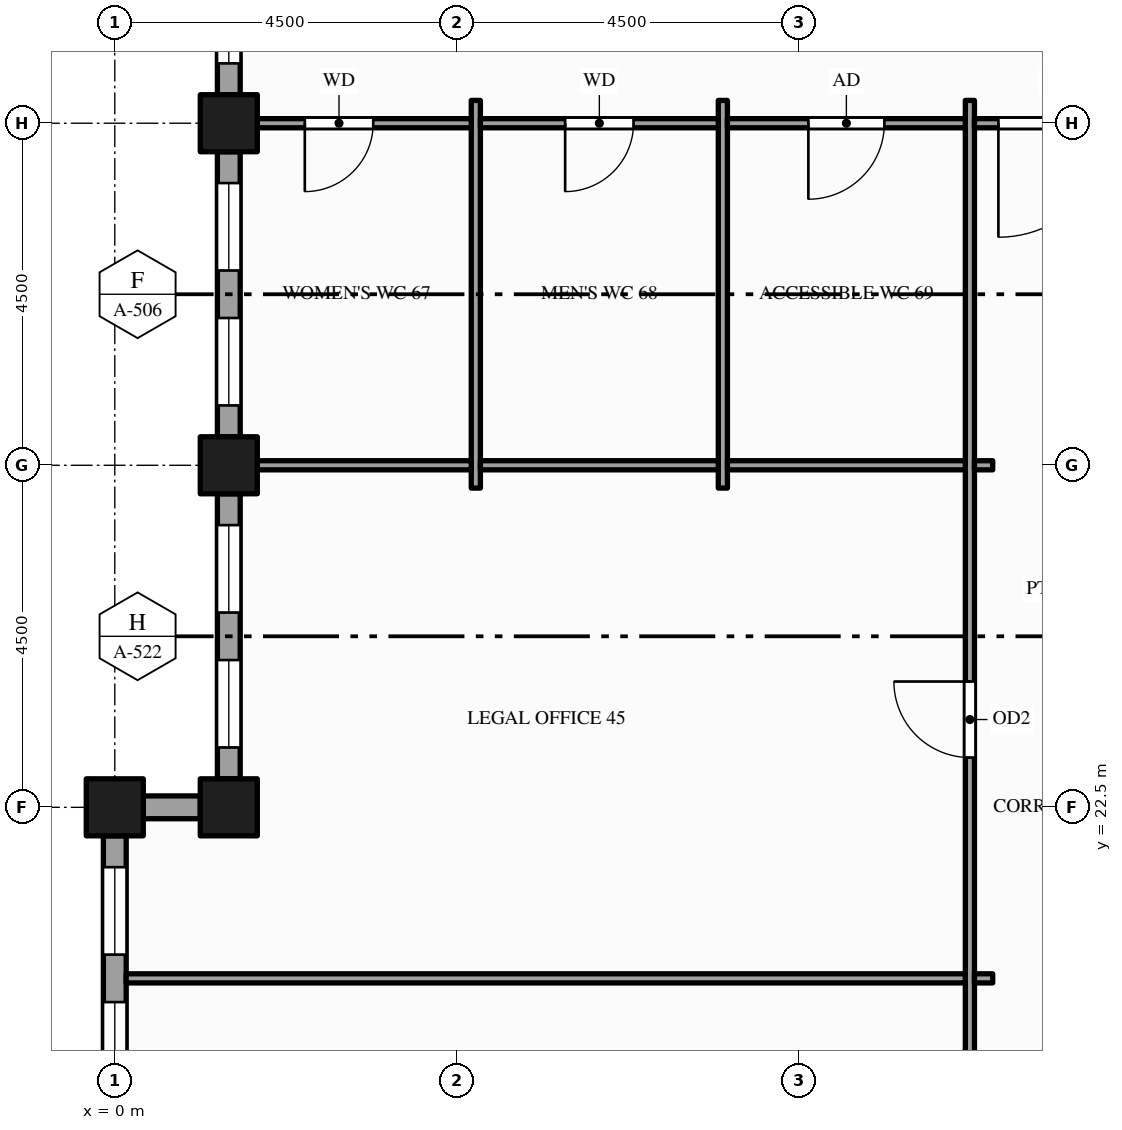
"""IFC4 building model, lengths in metres.
Left out: names, types, materials, properties, quantities, classifications, styles, units other than length and angle.
Written with IfcOpenShell. Run it as: python <this file> out.ifc"""

import sys

from ifc_helpers import new_model, si_unit, direction, frame, frame_2d, origin, origin_2d, place, context, subcontext, project, spatial, rectangle, hollow_rectangle, extrude, element, fill, save


model = new_model("IFC4")
c1 = context("Model", 3, precision=1e-05, world=origin(), true_north=direction((0.0, 1.0)))
c2 = subcontext(c1, "Body", "Model", "MODEL_VIEW")
j1 = project(units=[si_unit("LENGTHUNIT", "METRE"), si_unit("PLANEANGLEUNIT", "RADIAN")], contexts=[c1])
p1 = place(None, origin())
s1 = spatial("IfcSite", under=j1, at=p1, CompositionType="ELEMENT")
p2 = place(p1, origin())
s2 = spatial("IfcBuilding", under=s1, at=p2, CompositionType="ELEMENT")
p3 = place(p2, frame((0.0, 0.0, 211.0)))
s3 = spatial("IfcBuildingStorey", under=s2, at=p3, CompositionType="ELEMENT", Elevation=211.0)
for number, where, z_axis, x_axis in (
    (1, (0.0, 22.5, -0.15), (0.0, 0.0, 1.0), (1.0, 0.0, 0.0)),
    (2, (1.5, 22.5, -0.15), (0.0, 0.0, 1.0), (1.0, 0.0, 0.0)),
    (3, (1.5, 27.0, -0.15), (0.0, 0.0, 1.0), (1.0, 0.0, 0.0)),
    (4, (1.5, 31.5, -0.15), (0.0, 0.0, 1.0), (1.0, 0.0, 0.0)),
):
    element("IfcColumn", number, at=place(p3, frame(where, z_axis=z_axis, x_axis=x_axis)), inside=s3, PredefinedType="COLUMN", context=c2, shape_type="SweptSolid", body=[
        extrude(hollow_rectangle(XDim=0.75, YDim=0.75, WallThickness=0.036, at=origin_2d()), origin(), (0.0, 0.0, 1.0), 4.0),
    ])
p4 = place(p3, frame((1.5, 36.0, 0.0), z_axis=(0.0, 0.0, 1.0), x_axis=(0.0, -1.0, 0.0)))
e5 = element("IfcWall", 5, at=p4, inside=s3, PredefinedType="STANDARD", context=c2, shape_type="SweptSolid", body=[
    extrude(rectangle(XDim=4.125, YDim=0.3, at=frame_2d((2.062, 0.0))), origin(), (0.0, 0.0, 1.0), 3.157),
])
p5 = place(p4, frame((0.4, 0.0, 0.9)))
e6 = element("IfcOpeningElement", 6, at=p5, cuts=e5, PredefinedType="OPENING", context=c2, shape_type="SweptSolid", body=[
    extrude(rectangle(XDim=1.55, YDim=2.0, at=frame_2d((0.775, 1.0))), frame((0.0, 0.16, 0.0), z_axis=(0.0, -1.0, 0.0), x_axis=(1.0, 0.0, 0.0)), (0.0, 0.0, 1.0), 0.32),
])
p6 = place(p4, frame((2.562, 0.0, 0.9)))
e7 = element("IfcOpeningElement", 7, at=p6, cuts=e5, PredefinedType="OPENING", context=c2, shape_type="SweptSolid", body=[
    extrude(rectangle(XDim=1.15, YDim=2.0, at=frame_2d((0.575, 1.0))), frame((0.0, 0.16, 0.0), z_axis=(0.0, -1.0, 0.0), x_axis=(1.0, 0.0, 0.0)), (0.0, 0.0, 1.0), 0.32),
])
p7 = place(p3, frame((1.5, 31.125, 0.0), z_axis=(0.0, 0.0, 1.0), x_axis=(0.0, -1.0, 0.0)))
e8 = element("IfcWall", 8, at=p7, inside=s3, PredefinedType="STANDARD", context=c2, shape_type="SweptSolid", body=[
    extrude(rectangle(XDim=3.75, YDim=0.3, at=frame_2d((1.875, 0.0))), origin(), (0.0, 0.0, 1.0), 3.157),
])
p8 = place(p7, frame((0.413, 0.0, 0.9)))
e9 = element("IfcOpeningElement", 9, at=p8, cuts=e8, PredefinedType="OPENING", context=c2, shape_type="SweptSolid", body=[
    extrude(rectangle(XDim=1.15, YDim=2.0, at=frame_2d((0.575, 1.0))), frame((0.0, 0.16, 0.0), z_axis=(0.0, -1.0, 0.0), x_axis=(1.0, 0.0, 0.0)), (0.0, 0.0, 1.0), 0.32),
])
p9 = place(p7, frame((2.188, 0.0, 0.9)))
e10 = element("IfcOpeningElement", 10, at=p9, cuts=e8, PredefinedType="OPENING", context=c2, shape_type="SweptSolid", body=[
    extrude(rectangle(XDim=1.15, YDim=2.0, at=frame_2d((0.575, 1.0))), frame((0.0, 0.16, 0.0), z_axis=(0.0, -1.0, 0.0), x_axis=(1.0, 0.0, 0.0)), (0.0, 0.0, 1.0), 0.32),
])
p10 = place(p3, frame((1.5, 26.625, 0.0), z_axis=(0.0, 0.0, 1.0), x_axis=(0.0, -1.0, 0.0)))
e11 = element("IfcWall", 11, at=p10, inside=s3, PredefinedType="STANDARD", context=c2, shape_type="SweptSolid", body=[
    extrude(rectangle(XDim=3.75, YDim=0.3, at=frame_2d((1.875, 0.0))), origin(), (0.0, 0.0, 1.0), 3.157),
])
p11 = place(p10, frame((0.413, 0.0, 0.9)))
e12 = element("IfcOpeningElement", 12, at=p11, cuts=e11, PredefinedType="OPENING", context=c2, shape_type="SweptSolid", body=[
    extrude(rectangle(XDim=1.15, YDim=2.0, at=frame_2d((0.575, 1.0))), frame((0.0, 0.16, 0.0), z_axis=(0.0, -1.0, 0.0), x_axis=(1.0, 0.0, 0.0)), (0.0, 0.0, 1.0), 0.32),
])
p12 = place(p10, frame((2.188, 0.0, 0.9)))
e13 = element("IfcOpeningElement", 13, at=p12, cuts=e11, PredefinedType="OPENING", context=c2, shape_type="SweptSolid", body=[
    extrude(rectangle(XDim=1.15, YDim=2.0, at=frame_2d((0.575, 1.0))), frame((0.0, 0.16, 0.0), z_axis=(0.0, -1.0, 0.0), x_axis=(1.0, 0.0, 0.0)), (0.0, 0.0, 1.0), 0.32),
])
p13 = place(p3, frame((1.125, 22.5, 0.0), z_axis=(0.0, 0.0, 1.0), x_axis=(-1.0, 0.0, 0.0)))
e14 = element("IfcWall", 14, at=p13, inside=s3, PredefinedType="STANDARD", context=c2, shape_type="SweptSolid", body=[
    extrude(rectangle(XDim=0.75, YDim=0.3, at=frame_2d((0.375, 0.0))), origin(), (0.0, 0.0, 1.0), 3.157),
])
p14 = place(p3, frame((0.0, 22.125, 0.0), z_axis=(0.0, 0.0, 1.0), x_axis=(0.0, -1.0, 0.0)))
e15 = element("IfcWall", 15, at=p14, inside=s3, PredefinedType="STANDARD", context=c2, shape_type="SweptSolid", body=[
    extrude(rectangle(XDim=3.75, YDim=0.3, at=frame_2d((1.875, 0.0))), origin(), (0.0, 0.0, 1.0), 3.157),
])
p15 = place(p14, frame((0.413, 0.0, 0.9)))
e16 = element("IfcOpeningElement", 16, at=p15, cuts=e15, PredefinedType="OPENING", context=c2, shape_type="SweptSolid", body=[
    extrude(rectangle(XDim=1.15, YDim=2.0, at=frame_2d((0.575, 1.0))), frame((0.0, 0.16, 0.0), z_axis=(0.0, -1.0, 0.0), x_axis=(1.0, 0.0, 0.0)), (0.0, 0.0, 1.0), 0.32),
])
p16 = place(p14, frame((2.188, 0.0, 0.9)))
e17 = element("IfcOpeningElement", 17, at=p16, cuts=e15, PredefinedType="OPENING", context=c2, shape_type="SweptSolid", body=[
    extrude(rectangle(XDim=1.15, YDim=2.0, at=frame_2d((0.575, 1.0))), frame((0.0, 0.16, 0.0), z_axis=(0.0, -1.0, 0.0), x_axis=(1.0, 0.0, 0.0)), (0.0, 0.0, 1.0), 0.32),
])
for number, where, z_axis, x_axis in (
    (18, (4.75, 26.7, 0.0), (0.0, 0.0, 1.0), (0.0, 1.0, 0.0)),
    (19, (8.0, 26.7, 0.0), (0.0, 0.0, 1.0), (0.0, 1.0, 0.0)),
):
    element("IfcWall", number, at=place(p3, frame(where, z_axis=z_axis, x_axis=x_axis)), inside=s3, PredefinedType="PARTITIONING", context=c2, shape_type="SweptSolid", body=[
        extrude(rectangle(XDim=5.1, YDim=0.12, at=frame_2d((2.55, 0.0))), origin(), (0.0, 0.0, 1.0), 3.85),
    ])
p17 = place(p3, frame((11.25, 13.2, 0.0), z_axis=(0.0, 0.0, 1.0), x_axis=(0.0, 1.0, 0.0)))
e20 = element("IfcWall", 20, at=p17, inside=s3, PredefinedType="PARTITIONING", context=c2, shape_type="SweptSolid", body=[
    extrude(rectangle(XDim=18.6, YDim=0.12, at=frame_2d((9.3, 0.0))), origin(), (0.0, 0.0, 1.0), 2.6),
])
p18 = place(p17, frame((3.175, 0.0, 0.0)))
e21 = element("IfcOpeningElement", 21, at=p18, cuts=e20, PredefinedType="OPENING", context=c2, shape_type="SweptSolid", body=[
    extrude(rectangle(XDim=1.0, YDim=2.1, at=frame_2d((0.5, 1.05))), frame((0.0, 0.07, 0.0), z_axis=(0.0, -1.0, 0.0), x_axis=(1.0, 0.0, 0.0)), (0.0, 0.0, 1.0), 0.14),
])
p19 = place(p17, frame((9.955, 0.0, 0.0)))
e22 = element("IfcOpeningElement", 22, at=p19, cuts=e20, PredefinedType="OPENING", context=c2, shape_type="SweptSolid", body=[
    extrude(rectangle(XDim=1.0, YDim=2.1, at=frame_2d((0.5, 1.05))), frame((0.0, 0.07, 0.0), z_axis=(0.0, -1.0, 0.0), x_axis=(1.0, 0.0, 0.0)), (0.0, 0.0, 1.0), 0.14),
])
p20 = place(p3, frame((0.15, 20.25, 0.0), z_axis=(0.0, 0.0, 1.0), x_axis=(1.0, 0.0, 0.0)))
e23 = element("IfcWall", 23, at=p20, inside=s3, PredefinedType="PARTITIONING", context=c2, shape_type="SweptSolid", body=[
    extrude(rectangle(XDim=11.04, YDim=0.12, at=frame_2d((5.52, 0.0))), origin(), (0.0, 0.0, 1.0), 2.87),
])
p21 = place(p3, frame((11.31, 20.25, 0.0), z_axis=(0.0, 0.0, 1.0), x_axis=(1.0, 0.0, 0.0)))
e24 = element("IfcWall", 24, at=p21, inside=s3, PredefinedType="PARTITIONING", context=c2, shape_type="SweptSolid", body=[
    extrude(rectangle(XDim=0.24, YDim=0.12, at=frame_2d((0.12, 0.0))), origin(), (0.0, 0.0, 1.0), 2.87),
])
p22 = place(p3, frame((1.65, 27.0, 0.0), z_axis=(0.0, 0.0, 1.0), x_axis=(1.0, 0.0, 0.0)))
e25 = element("IfcWall", 25, at=p22, inside=s3, PredefinedType="PARTITIONING", context=c2, shape_type="SweptSolid", body=[
    extrude(rectangle(XDim=3.04, YDim=0.12, at=frame_2d((1.52, 0.0))), origin(), (0.0, 0.0, 1.0), 2.87),
])
for number, where, z_axis, x_axis in (
    (26, (4.81, 27.0, 0.0), (0.0, 0.0, 1.0), (1.0, 0.0, 0.0)),
    (27, (8.06, 27.0, 0.0), (0.0, 0.0, 1.0), (1.0, 0.0, 0.0)),
):
    element("IfcWall", number, at=place(p3, frame(where, z_axis=z_axis, x_axis=x_axis)), inside=s3, PredefinedType="PARTITIONING", context=c2, shape_type="SweptSolid", body=[
        extrude(rectangle(XDim=3.13, YDim=0.12, at=frame_2d((1.565, 0.0))), origin(), (0.0, 0.0, 1.0), 2.87),
    ])
p23 = place(p3, frame((11.31, 27.0, 0.0), z_axis=(0.0, 0.0, 1.0), x_axis=(1.0, 0.0, 0.0)))
e28 = element("IfcWall", 28, at=p23, inside=s3, PredefinedType="PARTITIONING", context=c2, shape_type="SweptSolid", body=[
    extrude(rectangle(XDim=0.24, YDim=0.12, at=frame_2d((0.12, 0.0))), origin(), (0.0, 0.0, 1.0), 2.87),
])
p24 = place(p3, frame((1.65, 31.5, 0.0), z_axis=(0.0, 0.0, 1.0), x_axis=(1.0, 0.0, 0.0)))
e29 = element("IfcWall", 29, at=p24, inside=s3, PredefinedType="PARTITIONING", context=c2, shape_type="SweptSolid", body=[
    extrude(rectangle(XDim=3.04, YDim=0.12, at=frame_2d((1.52, 0.0))), origin(), (0.0, 0.0, 1.0), 2.87),
])
p25 = place(p24, frame((0.85, 0.0, 0.0)))
e30 = element("IfcOpeningElement", 30, at=p25, cuts=e29, PredefinedType="OPENING", context=c2, shape_type="SweptSolid", body=[
    extrude(rectangle(XDim=0.9, YDim=2.1, at=frame_2d((0.45, 1.05))), frame((0.0, 0.07, 0.0), z_axis=(0.0, -1.0, 0.0), x_axis=(1.0, 0.0, 0.0)), (0.0, 0.0, 1.0), 0.14),
])
p26 = place(p3, frame((4.81, 31.5, 0.0), z_axis=(0.0, 0.0, 1.0), x_axis=(1.0, 0.0, 0.0)))
e31 = element("IfcWall", 31, at=p26, inside=s3, PredefinedType="PARTITIONING", context=c2, shape_type="SweptSolid", body=[
    extrude(rectangle(XDim=3.13, YDim=0.12, at=frame_2d((1.565, 0.0))), origin(), (0.0, 0.0, 1.0), 2.87),
])
p27 = place(p26, frame((1.115, 0.0, 0.0)))
e32 = element("IfcOpeningElement", 32, at=p27, cuts=e31, PredefinedType="OPENING", context=c2, shape_type="SweptSolid", body=[
    extrude(rectangle(XDim=0.9, YDim=2.1, at=frame_2d((0.45, 1.05))), frame((0.0, 0.07, 0.0), z_axis=(0.0, -1.0, 0.0), x_axis=(1.0, 0.0, 0.0)), (0.0, 0.0, 1.0), 0.14),
])
p28 = place(p3, frame((8.06, 31.5, 0.0), z_axis=(0.0, 0.0, 1.0), x_axis=(1.0, 0.0, 0.0)))
e33 = element("IfcWall", 33, at=p28, inside=s3, PredefinedType="PARTITIONING", context=c2, shape_type="SweptSolid", body=[
    extrude(rectangle(XDim=3.13, YDim=0.12, at=frame_2d((1.565, 0.0))), origin(), (0.0, 0.0, 1.0), 2.87),
])
p29 = place(p28, frame((1.065, 0.0, 0.0)))
e34 = element("IfcOpeningElement", 34, at=p29, cuts=e33, PredefinedType="OPENING", context=c2, shape_type="SweptSolid", body=[
    extrude(rectangle(XDim=1.0, YDim=2.1, at=frame_2d((0.5, 1.05))), frame((0.0, 0.07, 0.0), z_axis=(0.0, -1.0, 0.0), x_axis=(1.0, 0.0, 0.0)), (0.0, 0.0, 1.0), 0.14),
])
p30 = place(p3, frame((11.31, 31.5, 0.0), z_axis=(0.0, 0.0, 1.0), x_axis=(1.0, 0.0, 0.0)))
e35 = element("IfcWall", 35, at=p30, inside=s3, PredefinedType="PARTITIONING", context=c2, shape_type="SweptSolid", body=[
    extrude(rectangle(XDim=2.13, YDim=0.12, at=frame_2d((1.065, 0.0))), origin(), (0.0, 0.0, 1.0), 2.87),
])
p31 = place(p30, frame((0.315, 0.0, 0.0)))
e36 = element("IfcOpeningElement", 36, at=p31, cuts=e35, PredefinedType="OPENING", context=c2, shape_type="SweptSolid", body=[
    extrude(rectangle(XDim=1.5, YDim=2.1, at=frame_2d((0.75, 1.05))), frame((0.0, 0.07, 0.0), z_axis=(0.0, -1.0, 0.0), x_axis=(1.0, 0.0, 0.0)), (0.0, 0.0, 1.0), 0.14),
])
p32 = place(p6, origin())
e37 = element("IfcWindow", 37, at=p32, inside=s3, PartitioningType="SINGLE_PANEL", PredefinedType="WINDOW", context=c2, shape_type="SweptSolid", body=[
    extrude(rectangle(XDim=1.15, YDim=2.0, at=frame_2d((0.575, 1.0))), frame((0.0, 0.03, 0.0), z_axis=(0.0, -1.0, 0.0), x_axis=(1.0, 0.0, 0.0)), (0.0, 0.0, 1.0), 0.06),
])
fill(e7, e37)
p33 = place(p8, origin())
e38 = element("IfcWindow", 38, at=p33, inside=s3, PartitioningType="SINGLE_PANEL", PredefinedType="WINDOW", context=c2, shape_type="SweptSolid", body=[
    extrude(rectangle(XDim=1.15, YDim=2.0, at=frame_2d((0.575, 1.0))), frame((0.0, 0.03, 0.0), z_axis=(0.0, -1.0, 0.0), x_axis=(1.0, 0.0, 0.0)), (0.0, 0.0, 1.0), 0.06),
])
fill(e9, e38)
p34 = place(p9, origin())
e39 = element("IfcWindow", 39, at=p34, inside=s3, PartitioningType="SINGLE_PANEL", PredefinedType="WINDOW", context=c2, shape_type="SweptSolid", body=[
    extrude(rectangle(XDim=1.15, YDim=2.0, at=frame_2d((0.575, 1.0))), frame((0.0, 0.03, 0.0), z_axis=(0.0, -1.0, 0.0), x_axis=(1.0, 0.0, 0.0)), (0.0, 0.0, 1.0), 0.06),
])
fill(e10, e39)
p35 = place(p11, origin())
e40 = element("IfcWindow", 40, at=p35, inside=s3, PartitioningType="SINGLE_PANEL", PredefinedType="WINDOW", context=c2, shape_type="SweptSolid", body=[
    extrude(rectangle(XDim=1.15, YDim=2.0, at=frame_2d((0.575, 1.0))), frame((0.0, 0.03, 0.0), z_axis=(0.0, -1.0, 0.0), x_axis=(1.0, 0.0, 0.0)), (0.0, 0.0, 1.0), 0.06),
])
fill(e12, e40)
p36 = place(p12, origin())
e41 = element("IfcWindow", 41, at=p36, inside=s3, PartitioningType="SINGLE_PANEL", PredefinedType="WINDOW", context=c2, shape_type="SweptSolid", body=[
    extrude(rectangle(XDim=1.15, YDim=2.0, at=frame_2d((0.575, 1.0))), frame((0.0, 0.03, 0.0), z_axis=(0.0, -1.0, 0.0), x_axis=(1.0, 0.0, 0.0)), (0.0, 0.0, 1.0), 0.06),
])
fill(e13, e41)
p37 = place(p15, origin())
e42 = element("IfcWindow", 42, at=p37, inside=s3, PartitioningType="SINGLE_PANEL", PredefinedType="WINDOW", context=c2, shape_type="SweptSolid", body=[
    extrude(rectangle(XDim=1.15, YDim=2.0, at=frame_2d((0.575, 1.0))), frame((0.0, 0.03, 0.0), z_axis=(0.0, -1.0, 0.0), x_axis=(1.0, 0.0, 0.0)), (0.0, 0.0, 1.0), 0.06),
])
fill(e16, e42)
p38 = place(p16, origin())
e43 = element("IfcWindow", 43, at=p38, inside=s3, PartitioningType="SINGLE_PANEL", PredefinedType="WINDOW", context=c2, shape_type="SweptSolid", body=[
    extrude(rectangle(XDim=1.15, YDim=2.0, at=frame_2d((0.575, 1.0))), frame((0.0, 0.03, 0.0), z_axis=(0.0, -1.0, 0.0), x_axis=(1.0, 0.0, 0.0)), (0.0, 0.0, 1.0), 0.06),
])
fill(e17, e43)
p39 = place(p31, origin())
e44 = element("IfcDoor", 44, at=p39, inside=s3, OperationType="SINGLE_SWING_LEFT", PredefinedType="DOOR", context=c2, shape_type="SweptSolid", body=[
    extrude(rectangle(XDim=1.5, YDim=2.1, at=frame_2d((0.75, 1.05))), frame((0.0, 0.025, 0.0), z_axis=(0.0, -1.0, 0.0), x_axis=(1.0, 0.0, 0.0)), (0.0, 0.0, 1.0), 0.05),
])
fill(e36, e44)
p40 = place(p19, origin())
e45 = element("IfcDoor", 45, at=p40, inside=s3, OperationType="SINGLE_SWING_RIGHT", PredefinedType="DOOR", context=c2, shape_type="SweptSolid", body=[
    extrude(rectangle(XDim=1.0, YDim=2.1, at=frame_2d((0.5, 1.05))), frame((0.0, 0.025, 0.0), z_axis=(0.0, -1.0, 0.0), x_axis=(1.0, 0.0, 0.0)), (0.0, 0.0, 1.0), 0.05),
])
fill(e22, e45)
p41 = place(p25, origin())
e46 = element("IfcDoor", 46, at=p41, inside=s3, OperationType="SINGLE_SWING_LEFT", PredefinedType="DOOR", context=c2, shape_type="SweptSolid", body=[
    extrude(rectangle(XDim=0.9, YDim=2.1, at=frame_2d((0.45, 1.05))), frame((0.0, 0.025, 0.0), z_axis=(0.0, -1.0, 0.0), x_axis=(1.0, 0.0, 0.0)), (0.0, 0.0, 1.0), 0.05),
])
fill(e30, e46)
p42 = place(p27, origin())
e47 = element("IfcDoor", 47, at=p42, inside=s3, OperationType="SINGLE_SWING_LEFT", PredefinedType="DOOR", context=c2, shape_type="SweptSolid", body=[
    extrude(rectangle(XDim=0.9, YDim=2.1, at=frame_2d((0.45, 1.05))), frame((0.0, 0.025, 0.0), z_axis=(0.0, -1.0, 0.0), x_axis=(1.0, 0.0, 0.0)), (0.0, 0.0, 1.0), 0.05),
])
fill(e32, e47)
p43 = place(p29, origin())
e48 = element("IfcDoor", 48, at=p43, inside=s3, OperationType="SINGLE_SWING_LEFT", PredefinedType="DOOR", context=c2, shape_type="SweptSolid", body=[
    extrude(rectangle(XDim=1.0, YDim=2.1, at=frame_2d((0.5, 1.05))), frame((0.0, 0.025, 0.0), z_axis=(0.0, -1.0, 0.0), x_axis=(1.0, 0.0, 0.0)), (0.0, 0.0, 1.0), 0.05),
])
fill(e34, e48)
save(model, sys.argv[1])
